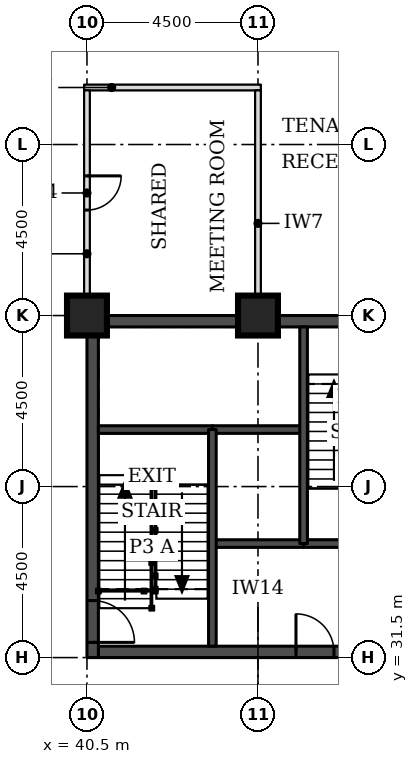
"""IFC4 building model, lengths in metres.
Left out: names, types, materials, properties, quantities, classifications, styles, units other than length and angle.
Written with IfcOpenShell. Run it as: python <this file> out.ifc"""

import sys

from ifc_helpers import new_model, si_unit, direction, frame, frame_2d, origin, origin_2d, place, context, subcontext, project, spatial, rectangle, extrude, element, fill, save


model = new_model("IFC4")
c1 = context("Model", 3, precision=1e-05, world=origin(), true_north=direction((0.0, 1.0)))
c2 = subcontext(c1, "Body", "Model", "MODEL_VIEW")
j1 = project(units=[si_unit("LENGTHUNIT", "METRE"), si_unit("PLANEANGLEUNIT", "RADIAN")], contexts=[c1])
p1 = place(None, origin())
s1 = spatial("IfcSite", under=j1, at=p1, CompositionType="ELEMENT")
p2 = place(p1, origin())
s2 = spatial("IfcBuilding", under=s1, at=p2, CompositionType="ELEMENT")
p3 = place(p2, frame((0.0, 0.0, 82.6)))
s3 = spatial("IfcBuildingStorey", under=s2, at=p3, CompositionType="ELEMENT", Elevation=82.6)
for number, where, z_axis, x_axis in (
    (1, (40.5, 40.5, 0.0), (0.0, 0.0, 1.0), (1.0, 0.0, 0.0)),
    (2, (45.0, 40.5, 0.0), (0.0, 0.0, 1.0), (1.0, 0.0, 0.0)),
):
    element("IfcColumn", number, at=place(p3, frame(where, z_axis=z_axis, x_axis=x_axis)), inside=s3, PredefinedType="COLUMN", context=c2, shape_type="SweptSolid", body=[
        extrude(rectangle(XDim=1.05, YDim=1.05, at=origin_2d()), origin(), (0.0, 0.0, 1.0), 3.7),
    ])
p4 = place(p3, frame((40.8, 31.65, 0.0), z_axis=(0.0, 0.0, 1.0), x_axis=(1.0, 0.0, 0.0)))
e3 = element("IfcWall", 3, at=p4, inside=s3, PredefinedType="SHEAR", context=c2, shape_type="SweptSolid", body=[
    extrude(rectangle(XDim=8.4, YDim=0.3, at=frame_2d((4.2, 0.0))), origin(), (0.0, 0.0, 1.0), 3.7),
])
p5 = place(p4, frame((5.2, 0.0, 0.0)))
e4 = element("IfcOpeningElement", 4, at=p5, cuts=e3, PredefinedType="OPENING", context=c2, shape_type="SweptSolid", body=[
    extrude(rectangle(XDim=1.0, YDim=2.1, at=frame_2d((0.5, 1.05))), frame((0.0, 0.16, 0.0), z_axis=(0.0, -1.0, 0.0), x_axis=(1.0, 0.0, 0.0)), (0.0, 0.0, 1.0), 0.32),
])
p6 = place(p3, frame((40.8, 40.35, 0.0), z_axis=(0.0, 0.0, 1.0), x_axis=(1.0, 0.0, 0.0)))
e5 = element("IfcWall", 5, at=p6, inside=s3, PredefinedType="SHEAR", context=c2, shape_type="SweptSolid", body=[
    extrude(rectangle(XDim=8.4, YDim=0.3, at=frame_2d((4.2, 0.0))), origin(), (0.0, 0.0, 1.0), 3.7),
])
p7 = place(p6, frame((6.4, 0.0, 0.0)))
e6 = element("IfcOpeningElement", 6, at=p7, cuts=e5, PredefinedType="OPENING", context=c2, shape_type="SweptSolid", body=[
    extrude(rectangle(XDim=1.1, YDim=2.1, at=frame_2d((0.55, 1.05))), frame((0.0, 0.16, 0.0), z_axis=(0.0, -1.0, 0.0), x_axis=(1.0, 0.0, 0.0)), (0.0, 0.0, 1.0), 0.32),
])
p8 = place(p3, frame((40.65, 31.5, 0.0), z_axis=(0.0, 0.0, 1.0), x_axis=(0.0, 1.0, 0.0)))
e7 = element("IfcWall", 7, at=p8, inside=s3, PredefinedType="SHEAR", context=c2, shape_type="SweptSolid", body=[
    extrude(rectangle(XDim=9.0, YDim=0.3, at=frame_2d((4.5, 0.0))), origin(), (0.0, 0.0, 1.0), 3.7),
])
p9 = place(p8, frame((0.4, 0.0, 0.0)))
e8 = element("IfcOpeningElement", 8, at=p9, cuts=e7, PredefinedType="OPENING", context=c2, shape_type="SweptSolid", body=[
    extrude(rectangle(XDim=1.1, YDim=2.1, at=frame_2d((0.55, 1.05))), frame((0.0, 0.16, 0.0), z_axis=(0.0, -1.0, 0.0), x_axis=(1.0, 0.0, 0.0)), (0.0, 0.0, 1.0), 0.32),
])
p10 = place(p3, frame((40.425, 46.5, 0.0), z_axis=(0.0, 0.0, 1.0), x_axis=(1.0, 0.0, 0.0)))
e9 = element("IfcWall", 9, at=p10, inside=s3, PredefinedType="PARTITIONING", context=c2, shape_type="SweptSolid", body=[
    extrude(rectangle(XDim=4.65, YDim=0.15, at=frame_2d((2.325, 0.0))), origin(), (0.0, 0.0, 1.0), 3.55),
])
p11 = place(p3, frame((40.5, 41.025, 0.0), z_axis=(0.0, 0.0, 1.0), x_axis=(0.0, 1.0, 0.0)))
e10 = element("IfcWall", 10, at=p11, inside=s3, PredefinedType="PARTITIONING", context=c2, shape_type="SweptSolid", body=[
    extrude(rectangle(XDim=5.4, YDim=0.15, at=frame_2d((2.7, 0.0))), origin(), (0.0, 0.0, 1.0), 3.55),
])
p12 = place(p11, frame((2.25, 0.0, 0.0)))
e11 = element("IfcOpeningElement", 11, at=p12, cuts=e10, PredefinedType="OPENING", context=c2, shape_type="SweptSolid", body=[
    extrude(rectangle(XDim=0.9, YDim=2.1, at=frame_2d((0.45, 1.05))), frame((0.0, 0.085, 0.0), z_axis=(0.0, -1.0, 0.0), x_axis=(1.0, 0.0, 0.0)), (0.0, 0.0, 1.0), 0.17),
])
p13 = place(p3, frame((45.0, 41.025, 0.0), z_axis=(0.0, 0.0, 1.0), x_axis=(0.0, 1.0, 0.0)))
e12 = element("IfcWall", 12, at=p13, inside=s3, PredefinedType="PARTITIONING", context=c2, shape_type="SweptSolid", body=[
    extrude(rectangle(XDim=5.4, YDim=0.15, at=frame_2d((2.7, 0.0))), origin(), (0.0, 0.0, 1.0), 3.55),
])
p14 = place(p3, frame((43.8, 34.5, 0.0), z_axis=(0.0, 0.0, 1.0), x_axis=(1.0, 0.0, 0.0)))
e13 = element("IfcWall", 13, at=p14, inside=s3, PredefinedType="SOLIDWALL", context=c2, shape_type="SweptSolid", body=[
    extrude(rectangle(XDim=2.4, YDim=0.2, at=frame_2d((1.2, 0.0))), origin(), (0.0, 0.0, 1.0), 3.55),
])
p15 = place(p3, frame((46.2, 34.5, 0.0), z_axis=(0.0, 0.0, 1.0), x_axis=(1.0, 0.0, 0.0)))
e14 = element("IfcWall", 14, at=p15, inside=s3, PredefinedType="SOLIDWALL", context=c2, shape_type="SweptSolid", body=[
    extrude(rectangle(XDim=3.0, YDim=0.2, at=frame_2d((1.5, 0.0))), origin(), (0.0, 0.0, 1.0), 3.55),
])
p16 = place(p3, frame((43.8, 37.5, 0.0), z_axis=(0.0, 0.0, 1.0), x_axis=(1.0, 0.0, 0.0)))
e15 = element("IfcWall", 15, at=p16, inside=s3, PredefinedType="SOLIDWALL", context=c2, shape_type="SweptSolid", body=[
    extrude(rectangle(XDim=2.4, YDim=0.2, at=frame_2d((1.2, 0.0))), origin(), (0.0, 0.0, 1.0), 3.7),
])
p17 = place(p3, frame((40.8, 37.5, 0.0), z_axis=(0.0, 0.0, 1.0), x_axis=(1.0, 0.0, 0.0)))
e16 = element("IfcWall", 16, at=p17, inside=s3, PredefinedType="SOLIDWALL", context=c2, shape_type="SweptSolid", body=[
    extrude(rectangle(XDim=3.0, YDim=0.2, at=frame_2d((1.5, 0.0))), origin(), (0.0, 0.0, 1.0), 3.55),
])
for number, where, z_axis, x_axis in (
    (17, (43.8, 31.8, 0.0), (0.0, 0.0, 1.0), (0.0, 1.0, 0.0)),
    (18, (46.2, 34.5, 0.0), (0.0, 0.0, 1.0), (0.0, 1.0, 0.0)),
):
    element("IfcWall", number, at=place(p3, frame(where, z_axis=z_axis, x_axis=x_axis)), inside=s3, PredefinedType="SOLIDWALL", context=c2, shape_type="SweptSolid", body=[
        extrude(rectangle(XDim=5.7, YDim=0.2, at=frame_2d((2.85, 0.0))), origin(), (0.0, 0.0, 1.0), 3.55),
    ])
p18 = place(p12, frame((0.9, 0.0, 0.0), z_axis=(0.0, 0.0, 1.0), x_axis=(-1.0, 0.0, 0.0)))
e19 = element("IfcDoor", 19, at=p18, inside=s3, OperationType="SINGLE_SWING_LEFT", PredefinedType="DOOR", context=c2, shape_type="SweptSolid", body=[
    extrude(rectangle(XDim=0.9, YDim=2.1, at=frame_2d((0.45, 1.05))), frame((0.0, 0.025, 0.0), z_axis=(0.0, -1.0, 0.0), x_axis=(1.0, 0.0, 0.0)), (0.0, 0.0, 1.0), 0.05),
])
fill(e11, e19)
p19 = place(p9, frame((1.1, 0.0, 0.0), z_axis=(0.0, 0.0, 1.0), x_axis=(-1.0, 0.0, 0.0)))
e20 = element("IfcDoor", 20, at=p19, inside=s3, OperationType="SINGLE_SWING_RIGHT", PredefinedType="DOOR", context=c2, shape_type="SweptSolid", body=[
    extrude(rectangle(XDim=1.1, YDim=2.1, at=frame_2d((0.55, 1.05))), frame((0.0, 0.025, 0.0), z_axis=(0.0, -1.0, 0.0), x_axis=(1.0, 0.0, 0.0)), (0.0, 0.0, 1.0), 0.05),
])
fill(e8, e20)
p20 = place(p5, origin())
e21 = element("IfcDoor", 21, at=p20, inside=s3, OperationType="SINGLE_SWING_LEFT", PredefinedType="DOOR", context=c2, shape_type="SweptSolid", body=[
    extrude(rectangle(XDim=1.0, YDim=2.1, at=frame_2d((0.5, 1.05))), frame((0.0, 0.025, 0.0), z_axis=(0.0, -1.0, 0.0), x_axis=(1.0, 0.0, 0.0)), (0.0, 0.0, 1.0), 0.05),
])
fill(e4, e21)
save(model, sys.argv[1])
